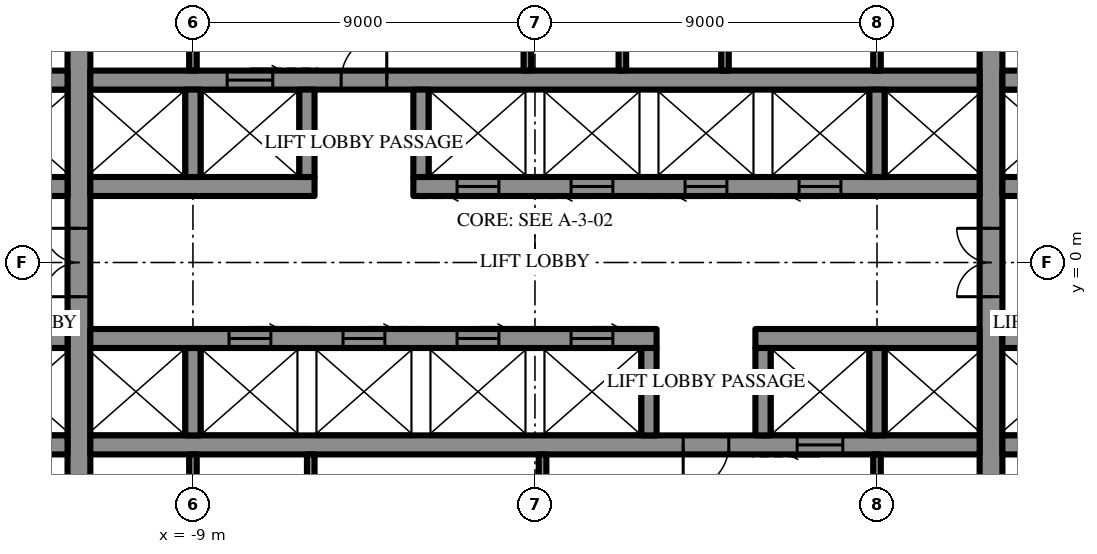
"""IFC4 building model, lengths in metres.
Left out: names, types, materials, properties, quantities, classifications, styles, units other than length and angle.
Written with IfcOpenShell. Run it as: python <this file> out.ifc"""

import sys

from ifc_helpers import new_model, si_unit, direction, frame, frame_2d, origin, place, context, subcontext, project, spatial, rectangle, extrude, element, fill, save


model = new_model("IFC4")
c1 = context("Model", 3, precision=1e-05, world=origin(), true_north=direction((0.0, 1.0)))
c2 = subcontext(c1, "Body", "Model", "MODEL_VIEW")
j1 = project(units=[si_unit("LENGTHUNIT", "METRE"), si_unit("PLANEANGLEUNIT", "RADIAN")], contexts=[c1])
p1 = place(None, origin())
s1 = spatial("IfcSite", under=j1, at=p1, CompositionType="ELEMENT")
p2 = place(p1, origin())
s2 = spatial("IfcBuilding", under=s1, at=p2, CompositionType="ELEMENT")
p3 = place(p2, frame((0.0, 0.0, 186.7)))
s3 = spatial("IfcBuildingStorey", under=s2, at=p3, CompositionType="ELEMENT", Elevation=186.7)
p4 = place(p3, frame((12.0, -10.7, 0.0), z_axis=(0.0, 0.0, 1.0), x_axis=(0.0, 1.0, 0.0)))
e1 = element("IfcWall", 1, at=p4, inside=s3, PredefinedType="SHEAR", context=c2, shape_type="SweptSolid", body=[
    extrude(rectangle(XDim=21.4, YDim=0.6, at=frame_2d((10.7, 0.0))), origin(), (0.0, 0.0, 1.0), 4.2),
])
p5 = place(p4, frame((9.8, 0.0, 0.0)))
e2 = element("IfcOpeningElement", 2, at=p5, cuts=e1, PredefinedType="OPENING", context=c2, shape_type="SweptSolid", body=[
    extrude(rectangle(XDim=1.8, YDim=2.4, at=frame_2d((0.9, 1.2))), frame((0.0, 0.31, 0.0), z_axis=(0.0, -1.0, 0.0), x_axis=(1.0, 0.0, 0.0)), (0.0, 0.0, 1.0), 0.62),
])
p6 = place(p3, frame((-12.0, -10.7, 0.0), z_axis=(0.0, 0.0, 1.0), x_axis=(0.0, 1.0, 0.0)))
e3 = element("IfcWall", 3, at=p6, inside=s3, PredefinedType="SHEAR", context=c2, shape_type="SweptSolid", body=[
    extrude(rectangle(XDim=21.4, YDim=0.6, at=frame_2d((10.7, 0.0))), origin(), (0.0, 0.0, 1.0), 4.2),
])
p7 = place(p6, frame((9.8, 0.0, 0.0)))
e4 = element("IfcOpeningElement", 4, at=p7, cuts=e3, PredefinedType="OPENING", context=c2, shape_type="SweptSolid", body=[
    extrude(rectangle(XDim=1.8, YDim=2.4, at=frame_2d((0.9, 1.2))), frame((0.0, 0.31, 0.0), z_axis=(0.0, -1.0, 0.0), x_axis=(1.0, 0.0, 0.0)), (0.0, 0.0, 1.0), 0.62),
])
p8 = place(p3, frame((-14.7, 2.0, 0.0), z_axis=(0.0, 0.0, 1.0), x_axis=(1.0, 0.0, 0.0)))
e5 = element("IfcWall", 5, at=p8, inside=s3, PredefinedType="SHEAR", context=c2, shape_type="SweptSolid", body=[
    extrude(rectangle(XDim=2.4, YDim=0.5, at=frame_2d((1.2, 0.0))), origin(), (0.0, 0.0, 1.0), 4.2),
])
p9 = place(p3, frame((-11.7, 2.0, 0.0), z_axis=(0.0, 0.0, 1.0), x_axis=(1.0, 0.0, 0.0)))
e6 = element("IfcWall", 6, at=p9, inside=s3, PredefinedType="SHEAR", context=c2, shape_type="SweptSolid", body=[
    extrude(rectangle(XDim=5.9, YDim=0.5, at=frame_2d((2.95, 0.0))), origin(), (0.0, 0.0, 1.0), 4.2),
])
p10 = place(p3, frame((-3.2, 2.0, 0.0), z_axis=(0.0, 0.0, 1.0), x_axis=(1.0, 0.0, 0.0)))
e7 = element("IfcWall", 7, at=p10, inside=s3, PredefinedType="SHEAR", context=c2, shape_type="SweptSolid", body=[
    extrude(rectangle(XDim=14.9, YDim=0.5, at=frame_2d((7.45, 0.0))), origin(), (0.0, 0.0, 1.0), 4.2),
])
p11 = place(p10, frame((1.15, 0.0, 0.0)))
e8 = element("IfcOpeningElement", 8, at=p11, cuts=e7, PredefinedType="OPENING", context=c2, shape_type="SweptSolid", body=[
    extrude(rectangle(XDim=1.1, YDim=2.2, at=frame_2d((0.55, 1.1))), frame((0.0, 0.26, 0.0), z_axis=(0.0, -1.0, 0.0), x_axis=(1.0, 0.0, 0.0)), (0.0, 0.0, 1.0), 0.52),
])
p12 = place(p10, frame((4.15, 0.0, 0.0)))
e9 = element("IfcOpeningElement", 9, at=p12, cuts=e7, PredefinedType="OPENING", context=c2, shape_type="SweptSolid", body=[
    extrude(rectangle(XDim=1.1, YDim=2.2, at=frame_2d((0.55, 1.1))), frame((0.0, 0.26, 0.0), z_axis=(0.0, -1.0, 0.0), x_axis=(1.0, 0.0, 0.0)), (0.0, 0.0, 1.0), 0.52),
])
p13 = place(p10, frame((7.15, 0.0, 0.0)))
e10 = element("IfcOpeningElement", 10, at=p13, cuts=e7, PredefinedType="OPENING", context=c2, shape_type="SweptSolid", body=[
    extrude(rectangle(XDim=1.1, YDim=2.2, at=frame_2d((0.55, 1.1))), frame((0.0, 0.26, 0.0), z_axis=(0.0, -1.0, 0.0), x_axis=(1.0, 0.0, 0.0)), (0.0, 0.0, 1.0), 0.52),
])
p14 = place(p10, frame((10.15, 0.0, 0.0)))
e11 = element("IfcOpeningElement", 11, at=p14, cuts=e7, PredefinedType="OPENING", context=c2, shape_type="SweptSolid", body=[
    extrude(rectangle(XDim=1.1, YDim=2.2, at=frame_2d((0.55, 1.1))), frame((0.0, 0.26, 0.0), z_axis=(0.0, -1.0, 0.0), x_axis=(1.0, 0.0, 0.0)), (0.0, 0.0, 1.0), 0.52),
])
for number, where, z_axis, x_axis in (
    (12, (12.3, 2.0, 0.0), (0.0, 0.0, 1.0), (1.0, 0.0, 0.0)),
    (13, (-14.7, 4.8, 0.0), (0.0, 0.0, 1.0), (1.0, 0.0, 0.0)),
):
    element("IfcWall", number, at=place(p3, frame(where, z_axis=z_axis, x_axis=x_axis)), inside=s3, PredefinedType="SHEAR", context=c2, shape_type="SweptSolid", body=[
        extrude(rectangle(XDim=2.4, YDim=0.5, at=frame_2d((1.2, 0.0))), origin(), (0.0, 0.0, 1.0), 4.2),
    ])
p15 = place(p3, frame((-11.7, 4.8, 0.0), z_axis=(0.0, 0.0, 1.0), x_axis=(1.0, 0.0, 0.0)))
e14 = element("IfcWall", 14, at=p15, inside=s3, PredefinedType="SHEAR", context=c2, shape_type="SweptSolid", body=[
    extrude(rectangle(XDim=23.4, YDim=0.5, at=frame_2d((11.7, 0.0))), origin(), (0.0, 0.0, 1.0), 4.2),
])
p16 = place(p15, frame((6.6, 0.0, 0.0)))
e15 = element("IfcOpeningElement", 15, at=p16, cuts=e14, PredefinedType="OPENING", context=c2, shape_type="SweptSolid", body=[
    extrude(rectangle(XDim=1.2, YDim=2.2, at=frame_2d((0.6, 1.1))), frame((0.0, 0.26, 0.0), z_axis=(0.0, -1.0, 0.0), x_axis=(1.0, 0.0, 0.0)), (0.0, 0.0, 1.0), 0.52),
])
p17 = place(p15, frame((3.6, 0.0, 0.0)))
e16 = element("IfcOpeningElement", 16, at=p17, cuts=e14, PredefinedType="OPENING", context=c2, shape_type="SweptSolid", body=[
    extrude(rectangle(XDim=1.2, YDim=2.2, at=frame_2d((0.6, 1.1))), frame((0.0, 0.26, 0.0), z_axis=(0.0, -1.0, 0.0), x_axis=(1.0, 0.0, 0.0)), (0.0, 0.0, 1.0), 0.52),
])
p18 = place(p3, frame((12.3, 4.8, 0.0), z_axis=(0.0, 0.0, 1.0), x_axis=(1.0, 0.0, 0.0)))
e17 = element("IfcWall", 17, at=p18, inside=s3, PredefinedType="SHEAR", context=c2, shape_type="SweptSolid", body=[
    extrude(rectangle(XDim=2.4, YDim=0.5, at=frame_2d((1.2, 0.0))), origin(), (0.0, 0.0, 1.0), 4.2),
])
for number, where, z_axis, x_axis in (
    (18, (-9.0, 2.25, 0.0), (0.0, 0.0, 1.0), (0.0, 1.0, 0.0)),
    (19, (-6.0, 2.25, 0.0), (0.0, 0.0, 1.0), (0.0, 1.0, 0.0)),
    (20, (-3.0, 2.25, 0.0), (0.0, 0.0, 1.0), (0.0, 1.0, 0.0)),
    (21, (9.0, 2.25, 0.0), (0.0, 0.0, 1.0), (0.0, 1.0, 0.0)),
):
    element("IfcWall", number, at=place(p3, frame(where, z_axis=z_axis, x_axis=x_axis)), inside=s3, PredefinedType="SHEAR", context=c2, shape_type="SweptSolid", body=[
        extrude(rectangle(XDim=2.3, YDim=0.4, at=frame_2d((1.15, 0.0))), origin(), (0.0, 0.0, 1.0), 4.2),
    ])
p19 = place(p3, frame((-0.2, 5.05, 0.0), z_axis=(0.0, 0.0, 1.0), x_axis=(0.0, 1.0, 0.0)))
e22 = element("IfcWall", 22, at=p19, inside=s3, PredefinedType="SHEAR", context=c2, shape_type="SweptSolid", body=[
    extrude(rectangle(XDim=5.65, YDim=0.2, at=frame_2d((2.825, 0.0))), origin(), (0.0, 0.0, 1.0), 4.2),
])
p20 = place(p3, frame((14.7, -2.0, 0.0), z_axis=(0.0, 0.0, 1.0), x_axis=(-1.0, 0.0, 0.0)))
e23 = element("IfcWall", 23, at=p20, inside=s3, PredefinedType="SHEAR", context=c2, shape_type="SweptSolid", body=[
    extrude(rectangle(XDim=2.4, YDim=0.5, at=frame_2d((1.2, 0.0))), origin(), (0.0, 0.0, 1.0), 4.2),
])
p21 = place(p3, frame((11.7, -2.0, 0.0), z_axis=(0.0, 0.0, 1.0), x_axis=(-1.0, 0.0, 0.0)))
e24 = element("IfcWall", 24, at=p21, inside=s3, PredefinedType="SHEAR", context=c2, shape_type="SweptSolid", body=[
    extrude(rectangle(XDim=5.9, YDim=0.5, at=frame_2d((2.95, 0.0))), origin(), (0.0, 0.0, 1.0), 4.2),
])
p22 = place(p3, frame((3.2, -2.0, 0.0), z_axis=(0.0, 0.0, 1.0), x_axis=(-1.0, 0.0, 0.0)))
e25 = element("IfcWall", 25, at=p22, inside=s3, PredefinedType="SHEAR", context=c2, shape_type="SweptSolid", body=[
    extrude(rectangle(XDim=14.9, YDim=0.5, at=frame_2d((7.45, 0.0))), origin(), (0.0, 0.0, 1.0), 4.2),
])
p23 = place(p22, frame((1.15, 0.0, 0.0)))
e26 = element("IfcOpeningElement", 26, at=p23, cuts=e25, PredefinedType="OPENING", context=c2, shape_type="SweptSolid", body=[
    extrude(rectangle(XDim=1.1, YDim=2.2, at=frame_2d((0.55, 1.1))), frame((0.0, 0.26, 0.0), z_axis=(0.0, -1.0, 0.0), x_axis=(1.0, 0.0, 0.0)), (0.0, 0.0, 1.0), 0.52),
])
p24 = place(p22, frame((4.15, 0.0, 0.0)))
e27 = element("IfcOpeningElement", 27, at=p24, cuts=e25, PredefinedType="OPENING", context=c2, shape_type="SweptSolid", body=[
    extrude(rectangle(XDim=1.1, YDim=2.2, at=frame_2d((0.55, 1.1))), frame((0.0, 0.26, 0.0), z_axis=(0.0, -1.0, 0.0), x_axis=(1.0, 0.0, 0.0)), (0.0, 0.0, 1.0), 0.52),
])
p25 = place(p22, frame((7.15, 0.0, 0.0)))
e28 = element("IfcOpeningElement", 28, at=p25, cuts=e25, PredefinedType="OPENING", context=c2, shape_type="SweptSolid", body=[
    extrude(rectangle(XDim=1.1, YDim=2.2, at=frame_2d((0.55, 1.1))), frame((0.0, 0.26, 0.0), z_axis=(0.0, -1.0, 0.0), x_axis=(1.0, 0.0, 0.0)), (0.0, 0.0, 1.0), 0.52),
])
p26 = place(p22, frame((10.15, 0.0, 0.0)))
e29 = element("IfcOpeningElement", 29, at=p26, cuts=e25, PredefinedType="OPENING", context=c2, shape_type="SweptSolid", body=[
    extrude(rectangle(XDim=1.1, YDim=2.2, at=frame_2d((0.55, 1.1))), frame((0.0, 0.26, 0.0), z_axis=(0.0, -1.0, 0.0), x_axis=(1.0, 0.0, 0.0)), (0.0, 0.0, 1.0), 0.52),
])
for number, where, z_axis, x_axis in (
    (30, (-12.3, -2.0, 0.0), (0.0, 0.0, 1.0), (-1.0, 0.0, 0.0)),
    (31, (14.7, -4.8, 0.0), (0.0, 0.0, 1.0), (-1.0, 0.0, 0.0)),
):
    element("IfcWall", number, at=place(p3, frame(where, z_axis=z_axis, x_axis=x_axis)), inside=s3, PredefinedType="SHEAR", context=c2, shape_type="SweptSolid", body=[
        extrude(rectangle(XDim=2.4, YDim=0.5, at=frame_2d((1.2, 0.0))), origin(), (0.0, 0.0, 1.0), 4.2),
    ])
p27 = place(p3, frame((11.7, -4.8, 0.0), z_axis=(0.0, 0.0, 1.0), x_axis=(-1.0, 0.0, 0.0)))
e32 = element("IfcWall", 32, at=p27, inside=s3, PredefinedType="SHEAR", context=c2, shape_type="SweptSolid", body=[
    extrude(rectangle(XDim=23.4, YDim=0.5, at=frame_2d((11.7, 0.0))), origin(), (0.0, 0.0, 1.0), 4.2),
])
p28 = place(p27, frame((6.6, 0.0, 0.0)))
e33 = element("IfcOpeningElement", 33, at=p28, cuts=e32, PredefinedType="OPENING", context=c2, shape_type="SweptSolid", body=[
    extrude(rectangle(XDim=1.2, YDim=2.2, at=frame_2d((0.6, 1.1))), frame((0.0, 0.26, 0.0), z_axis=(0.0, -1.0, 0.0), x_axis=(1.0, 0.0, 0.0)), (0.0, 0.0, 1.0), 0.52),
])
p29 = place(p27, frame((3.6, 0.0, 0.0)))
e34 = element("IfcOpeningElement", 34, at=p29, cuts=e32, PredefinedType="OPENING", context=c2, shape_type="SweptSolid", body=[
    extrude(rectangle(XDim=1.2, YDim=2.2, at=frame_2d((0.6, 1.1))), frame((0.0, 0.26, 0.0), z_axis=(0.0, -1.0, 0.0), x_axis=(1.0, 0.0, 0.0)), (0.0, 0.0, 1.0), 0.52),
])
p30 = place(p3, frame((-12.3, -4.8, 0.0), z_axis=(0.0, 0.0, 1.0), x_axis=(-1.0, 0.0, 0.0)))
e35 = element("IfcWall", 35, at=p30, inside=s3, PredefinedType="SHEAR", context=c2, shape_type="SweptSolid", body=[
    extrude(rectangle(XDim=2.4, YDim=0.5, at=frame_2d((1.2, 0.0))), origin(), (0.0, 0.0, 1.0), 4.2),
])
for number, where, z_axis, x_axis in (
    (36, (9.0, -2.25, 0.0), (0.0, 0.0, 1.0), (0.0, -1.0, 0.0)),
    (37, (6.0, -2.25, 0.0), (0.0, 0.0, 1.0), (0.0, -1.0, 0.0)),
    (38, (3.0, -2.25, 0.0), (0.0, 0.0, 1.0), (0.0, -1.0, 0.0)),
    (39, (-9.0, -2.25, 0.0), (0.0, 0.0, 1.0), (0.0, -1.0, 0.0)),
):
    element("IfcWall", number, at=place(p3, frame(where, z_axis=z_axis, x_axis=x_axis)), inside=s3, PredefinedType="SHEAR", context=c2, shape_type="SweptSolid", body=[
        extrude(rectangle(XDim=2.3, YDim=0.4, at=frame_2d((1.15, 0.0))), origin(), (0.0, 0.0, 1.0), 4.2),
    ])
p31 = place(p3, frame((0.2, -5.05, 0.0), z_axis=(0.0, 0.0, 1.0), x_axis=(0.0, -1.0, 0.0)))
e40 = element("IfcWall", 40, at=p31, inside=s3, PredefinedType="SHEAR", context=c2, shape_type="SweptSolid", body=[
    extrude(rectangle(XDim=5.65, YDim=0.2, at=frame_2d((2.825, 0.0))), origin(), (0.0, 0.0, 1.0), 4.2),
])
for number, where, z_axis, x_axis in (
    (41, (-9.0, 5.05, 0.0), (0.0, 0.0, 1.0), (0.0, 1.0, 0.0)),
    (42, (9.0, 5.05, 0.0), (0.0, 0.0, 1.0), (0.0, 1.0, 0.0)),
    (43, (2.3, 5.05, 0.0), (0.0, 0.0, 1.0), (0.0, 1.0, 0.0)),
    (44, (5.0, 5.05, 0.0), (0.0, 0.0, 1.0), (0.0, 1.0, 0.0)),
    (45, (9.0, -5.05, 0.0), (0.0, 0.0, 1.0), (0.0, -1.0, 0.0)),
    (46, (-9.0, -5.05, 0.0), (0.0, 0.0, 1.0), (0.0, -1.0, 0.0)),
    (47, (-5.9, -5.05, 0.0), (0.0, 0.0, 1.0), (0.0, -1.0, 0.0)),
):
    element("IfcWall", number, at=place(p3, frame(where, z_axis=z_axis, x_axis=x_axis)), inside=s3, PredefinedType="PARTITIONING", context=c2, shape_type="SweptSolid", body=[
        extrude(rectangle(XDim=5.65, YDim=0.2, at=frame_2d((2.825, 0.0))), origin(), (0.0, 0.0, 1.0), 4.0),
    ])
p32 = place(p16, origin())
e48 = element("IfcDoor", 48, at=p32, inside=s3, OperationType="SINGLE_SWING_LEFT", PredefinedType="DOOR", context=c2, shape_type="SweptSolid", body=[
    extrude(rectangle(XDim=1.2, YDim=2.2, at=frame_2d((0.6, 1.1))), frame((0.0, 0.025, 0.0), z_axis=(0.0, -1.0, 0.0), x_axis=(1.0, 0.0, 0.0)), (0.0, 0.0, 1.0), 0.05),
])
fill(e15, e48)
p33 = place(p28, origin())
e49 = element("IfcDoor", 49, at=p33, inside=s3, OperationType="SINGLE_SWING_LEFT", PredefinedType="DOOR", context=c2, shape_type="SweptSolid", body=[
    extrude(rectangle(XDim=1.2, YDim=2.2, at=frame_2d((0.6, 1.1))), frame((0.0, 0.025, 0.0), z_axis=(0.0, -1.0, 0.0), x_axis=(1.0, 0.0, 0.0)), (0.0, 0.0, 1.0), 0.05),
])
fill(e33, e49)
p34 = place(p5, origin())
e50 = element("IfcDoor", 50, at=p34, inside=s3, OperationType="DOUBLE_DOOR_SINGLE_SWING", PredefinedType="DOOR", context=c2, shape_type="SweptSolid", body=[
    extrude(rectangle(XDim=1.8, YDim=2.4, at=frame_2d((0.9, 1.2))), frame((0.0, 0.025, 0.0), z_axis=(0.0, -1.0, 0.0), x_axis=(1.0, 0.0, 0.0)), (0.0, 0.0, 1.0), 0.05),
])
fill(e2, e50)
p35 = place(p7, origin())
e51 = element("IfcDoor", 51, at=p35, inside=s3, OperationType="DOUBLE_DOOR_SINGLE_SWING", PredefinedType="DOOR", context=c2, shape_type="SweptSolid", body=[
    extrude(rectangle(XDim=1.8, YDim=2.4, at=frame_2d((0.9, 1.2))), frame((0.0, 0.025, 0.0), z_axis=(0.0, -1.0, 0.0), x_axis=(1.0, 0.0, 0.0)), (0.0, 0.0, 1.0), 0.05),
])
fill(e4, e51)
p36 = place(p17, origin())
e52 = element("IfcDoor", 52, at=p36, inside=s3, OperationType="SLIDING_TO_LEFT", PredefinedType="DOOR", context=c2, shape_type="SweptSolid", body=[
    extrude(rectangle(XDim=1.2, YDim=2.2, at=frame_2d((0.6, 1.1))), frame((0.0, 0.025, 0.0), z_axis=(0.0, -1.0, 0.0), x_axis=(1.0, 0.0, 0.0)), (0.0, 0.0, 1.0), 0.05),
])
fill(e16, e52)
p37 = place(p11, frame((1.1, 0.0, 0.0), z_axis=(0.0, 0.0, 1.0), x_axis=(-1.0, 0.0, 0.0)))
e53 = element("IfcDoor", 53, at=p37, inside=s3, OperationType="SLIDING_TO_LEFT", PredefinedType="DOOR", context=c2, shape_type="SweptSolid", body=[
    extrude(rectangle(XDim=1.1, YDim=2.2, at=frame_2d((0.55, 1.1))), frame((0.0, 0.025, 0.0), z_axis=(0.0, -1.0, 0.0), x_axis=(1.0, 0.0, 0.0)), (0.0, 0.0, 1.0), 0.05),
])
fill(e8, e53)
p38 = place(p12, frame((1.1, 0.0, 0.0), z_axis=(0.0, 0.0, 1.0), x_axis=(-1.0, 0.0, 0.0)))
e54 = element("IfcDoor", 54, at=p38, inside=s3, OperationType="SLIDING_TO_LEFT", PredefinedType="DOOR", context=c2, shape_type="SweptSolid", body=[
    extrude(rectangle(XDim=1.1, YDim=2.2, at=frame_2d((0.55, 1.1))), frame((0.0, 0.025, 0.0), z_axis=(0.0, -1.0, 0.0), x_axis=(1.0, 0.0, 0.0)), (0.0, 0.0, 1.0), 0.05),
])
fill(e9, e54)
p39 = place(p13, frame((1.1, 0.0, 0.0), z_axis=(0.0, 0.0, 1.0), x_axis=(-1.0, 0.0, 0.0)))
e55 = element("IfcDoor", 55, at=p39, inside=s3, OperationType="SLIDING_TO_LEFT", PredefinedType="DOOR", context=c2, shape_type="SweptSolid", body=[
    extrude(rectangle(XDim=1.1, YDim=2.2, at=frame_2d((0.55, 1.1))), frame((0.0, 0.025, 0.0), z_axis=(0.0, -1.0, 0.0), x_axis=(1.0, 0.0, 0.0)), (0.0, 0.0, 1.0), 0.05),
])
fill(e10, e55)
p40 = place(p14, frame((1.1, 0.0, 0.0), z_axis=(0.0, 0.0, 1.0), x_axis=(-1.0, 0.0, 0.0)))
e56 = element("IfcDoor", 56, at=p40, inside=s3, OperationType="SLIDING_TO_LEFT", PredefinedType="DOOR", context=c2, shape_type="SweptSolid", body=[
    extrude(rectangle(XDim=1.1, YDim=2.2, at=frame_2d((0.55, 1.1))), frame((0.0, 0.025, 0.0), z_axis=(0.0, -1.0, 0.0), x_axis=(1.0, 0.0, 0.0)), (0.0, 0.0, 1.0), 0.05),
])
fill(e11, e56)
p41 = place(p29, origin())
e57 = element("IfcDoor", 57, at=p41, inside=s3, OperationType="SLIDING_TO_LEFT", PredefinedType="DOOR", context=c2, shape_type="SweptSolid", body=[
    extrude(rectangle(XDim=1.2, YDim=2.2, at=frame_2d((0.6, 1.1))), frame((0.0, 0.025, 0.0), z_axis=(0.0, -1.0, 0.0), x_axis=(1.0, 0.0, 0.0)), (0.0, 0.0, 1.0), 0.05),
])
fill(e34, e57)
p42 = place(p23, frame((1.1, 0.0, 0.0), z_axis=(0.0, 0.0, 1.0), x_axis=(-1.0, 0.0, 0.0)))
e58 = element("IfcDoor", 58, at=p42, inside=s3, OperationType="SLIDING_TO_LEFT", PredefinedType="DOOR", context=c2, shape_type="SweptSolid", body=[
    extrude(rectangle(XDim=1.1, YDim=2.2, at=frame_2d((0.55, 1.1))), frame((0.0, 0.025, 0.0), z_axis=(0.0, -1.0, 0.0), x_axis=(1.0, 0.0, 0.0)), (0.0, 0.0, 1.0), 0.05),
])
fill(e26, e58)
p43 = place(p24, frame((1.1, 0.0, 0.0), z_axis=(0.0, 0.0, 1.0), x_axis=(-1.0, 0.0, 0.0)))
e59 = element("IfcDoor", 59, at=p43, inside=s3, OperationType="SLIDING_TO_LEFT", PredefinedType="DOOR", context=c2, shape_type="SweptSolid", body=[
    extrude(rectangle(XDim=1.1, YDim=2.2, at=frame_2d((0.55, 1.1))), frame((0.0, 0.025, 0.0), z_axis=(0.0, -1.0, 0.0), x_axis=(1.0, 0.0, 0.0)), (0.0, 0.0, 1.0), 0.05),
])
fill(e27, e59)
p44 = place(p25, frame((1.1, 0.0, 0.0), z_axis=(0.0, 0.0, 1.0), x_axis=(-1.0, 0.0, 0.0)))
e60 = element("IfcDoor", 60, at=p44, inside=s3, OperationType="SLIDING_TO_LEFT", PredefinedType="DOOR", context=c2, shape_type="SweptSolid", body=[
    extrude(rectangle(XDim=1.1, YDim=2.2, at=frame_2d((0.55, 1.1))), frame((0.0, 0.025, 0.0), z_axis=(0.0, -1.0, 0.0), x_axis=(1.0, 0.0, 0.0)), (0.0, 0.0, 1.0), 0.05),
])
fill(e28, e60)
p45 = place(p26, frame((1.1, 0.0, 0.0), z_axis=(0.0, 0.0, 1.0), x_axis=(-1.0, 0.0, 0.0)))
e61 = element("IfcDoor", 61, at=p45, inside=s3, OperationType="SLIDING_TO_LEFT", PredefinedType="DOOR", context=c2, shape_type="SweptSolid", body=[
    extrude(rectangle(XDim=1.1, YDim=2.2, at=frame_2d((0.55, 1.1))), frame((0.0, 0.025, 0.0), z_axis=(0.0, -1.0, 0.0), x_axis=(1.0, 0.0, 0.0)), (0.0, 0.0, 1.0), 0.05),
])
fill(e29, e61)
save(model, sys.argv[1])
